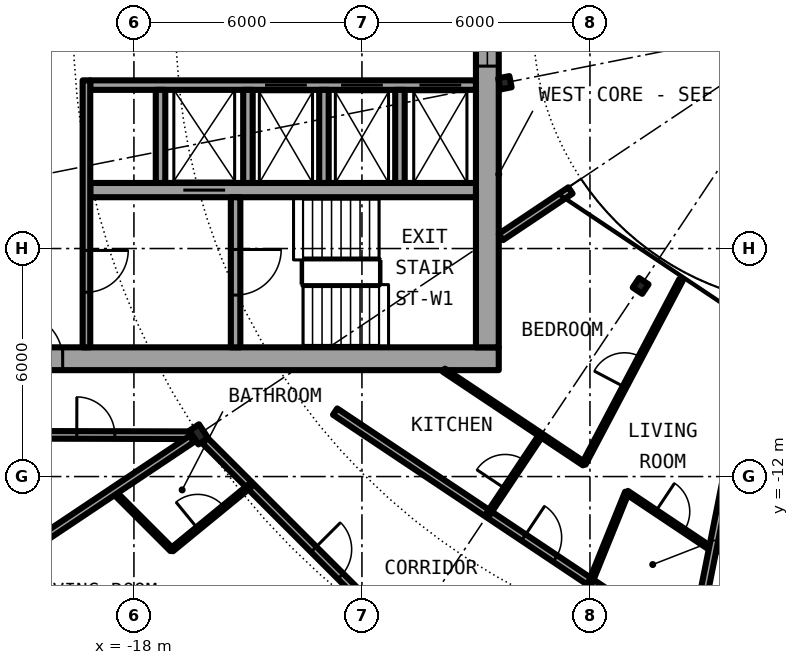
"""IFC4 building model, lengths in metres.
Left out: names, types, materials, properties, quantities, classifications, styles, units other than length and angle.
Written with IfcOpenShell. Run it as: python <this file> out.ifc"""

import sys

from ifc_helpers import new_model, si_unit, direction, frame, frame_2d, origin, origin_2d, place, context, subcontext, project, spatial, rectangle, i_section, extrude, element, fill, save


model = new_model("IFC4")
c1 = context("Model", 3, precision=1e-05, world=origin(), true_north=direction((0.0, 1.0)))
c2 = subcontext(c1, "Body", "Model", "MODEL_VIEW")
j1 = project(units=[si_unit("LENGTHUNIT", "METRE"), si_unit("PLANEANGLEUNIT", "RADIAN")], contexts=[c1])
p1 = place(None, origin())
s1 = spatial("IfcSite", under=j1, at=p1, CompositionType="ELEMENT")
p2 = place(p1, origin())
s2 = spatial("IfcBuilding", under=s1, at=p2, CompositionType="ELEMENT")
p3 = place(p2, frame((0.0, 0.0, 123.85)))
s3 = spatial("IfcBuildingStorey", under=s2, at=p3, CompositionType="ELEMENT", Elevation=123.85)
p4 = place(p3, frame((-16.297, -10.889, 0.0), z_axis=(0.0, 0.0, 1.0), x_axis=(-0.831469612303, -0.55557023302, 0.0)))
e1 = element("IfcColumn", 1, at=p4, inside=s3, PredefinedType="COLUMN", context=c2, shape_type="SweptSolid", body=[
    extrude(i_section(OverallWidth=0.307, OverallDepth=0.432, WebThickness=0.021, FlangeThickness=0.04, FilletRadius=0.027, at=origin_2d()), origin(), (0.0, 0.0, 1.0), 3.05),
])
for number, where, z_axis, x_axis in (
    (2, (-8.239, -1.639, 0.0), (0.0, 0.0, 1.0), (-0.981, -0.195, 0.0)),
    (3, (-4.667, -6.984, 0.0), (0.0, 0.0, 1.0), (-0.556, -0.831, 0.0)),
):
    element("IfcColumn", number, at=place(p3, frame(where, z_axis=z_axis, x_axis=x_axis)), inside=s3, PredefinedType="COLUMN", context=c2, shape_type="SweptSolid", body=[
        extrude(i_section(OverallWidth=0.3, OverallDepth=0.3, WebThickness=0.011, FlangeThickness=0.019, FilletRadius=0.027, at=origin_2d()), origin(), (0.0, 0.0, 1.0), 3.05),
    ])
p5 = place(p3, frame((-22.2, -8.9, 0.0), z_axis=(0.0, 0.0, 1.0), x_axis=(1.0, 0.0, 0.0)))
e4 = element("IfcWall", 4, at=p5, inside=s3, PredefinedType="SHEAR", context=c2, shape_type="SweptSolid", body=[
    extrude(rectangle(XDim=13.8, YDim=0.6, at=frame_2d((6.9, 0.0))), origin(), (0.0, 0.0, 1.0), 3.05),
])
p6 = place(p5, frame((1.125, 0.0, 0.0)))
e5 = element("IfcOpeningElement", 5, at=p6, cuts=e4, PredefinedType="OPENING", context=c2, shape_type="SweptSolid", body=[
    extrude(rectangle(XDim=1.2, YDim=2.3, at=frame_2d((0.6, 1.15))), frame((0.0, 0.31, 0.0), z_axis=(0.0, -1.0, 0.0), x_axis=(1.0, 0.0, 0.0)), (0.0, 0.0, 1.0), 0.62),
])
p7 = place(p3, frame((-8.7, 8.6, 0.0), z_axis=(0.0, 0.0, 1.0), x_axis=(0.0, -1.0, 0.0)))
e6 = element("IfcWall", 6, at=p7, inside=s3, PredefinedType="SHEAR", context=c2, shape_type="SweptSolid", body=[
    extrude(rectangle(XDim=17.2, YDim=0.6, at=frame_2d((8.6, 0.0))), origin(), (0.0, 0.0, 1.0), 3.05),
])
p8 = place(p7, frame((7.4, 0.0, 0.1)))
e7 = element("IfcOpeningElement", 7, at=p8, cuts=e6, PredefinedType="OPENING", context=c2, shape_type="SweptSolid", body=[
    extrude(rectangle(XDim=2.4, YDim=2.2, at=frame_2d((1.2, 1.1))), frame((0.0, 0.31, 0.0), z_axis=(0.0, -1.0, 0.0), x_axis=(1.0, 0.0, 0.0)), (0.0, 0.0, 1.0), 0.62),
])
p9 = place(p3, frame((-9.0, -1.7, 0.0), z_axis=(0.0, 0.0, 1.0), x_axis=(-1.0, 0.0, 0.0)))
e8 = element("IfcWall", 8, at=p9, inside=s3, PredefinedType="SHEAR", context=c2, shape_type="SweptSolid", body=[
    extrude(rectangle(XDim=10.15, YDim=0.25, at=frame_2d((5.075, 0.0))), origin(), (0.0, 0.0, 1.0), 3.05),
])
p10 = place(p9, frame((0.387, 0.0, 0.0)))
e9 = element("IfcOpeningElement", 9, at=p10, cuts=e8, PredefinedType="OPENING", context=c2, shape_type="SweptSolid", body=[
    extrude(rectangle(XDim=1.1, YDim=2.3, at=frame_2d((0.55, 1.15))), frame((0.0, 0.135, 0.0), z_axis=(0.0, -1.0, 0.0), x_axis=(1.0, 0.0, 0.0)), (0.0, 0.0, 1.0), 0.27),
])
p11 = place(p9, frame((2.45, 0.0, 0.0)))
e10 = element("IfcOpeningElement", 10, at=p11, cuts=e8, PredefinedType="OPENING", context=c2, shape_type="SweptSolid", body=[
    extrude(rectangle(XDim=1.1, YDim=2.3, at=frame_2d((0.55, 1.15))), frame((0.0, 0.135, 0.0), z_axis=(0.0, -1.0, 0.0), x_axis=(1.0, 0.0, 0.0)), (0.0, 0.0, 1.0), 0.27),
])
p12 = place(p9, frame((4.45, 0.0, 0.0)))
e11 = element("IfcOpeningElement", 11, at=p12, cuts=e8, PredefinedType="OPENING", context=c2, shape_type="SweptSolid", body=[
    extrude(rectangle(XDim=1.1, YDim=2.3, at=frame_2d((0.55, 1.15))), frame((0.0, 0.135, 0.0), z_axis=(0.0, -1.0, 0.0), x_axis=(1.0, 0.0, 0.0)), (0.0, 0.0, 1.0), 0.27),
])
p13 = place(p3, frame((-9.0, -4.462, 0.0), z_axis=(0.0, 0.0, 1.0), x_axis=(-1.0, 0.0, 0.0)))
e12 = element("IfcWall", 12, at=p13, inside=s3, PredefinedType="SHEAR", context=c2, shape_type="SweptSolid", body=[
    extrude(rectangle(XDim=10.15, YDim=0.375, at=frame_2d((5.075, 0.0))), origin(), (0.0, 0.0, 1.0), 3.05),
])
p14 = place(p13, frame((6.6, 0.0, 0.0)))
e13 = element("IfcOpeningElement", 13, at=p14, cuts=e12, PredefinedType="OPENING", context=c2, shape_type="SweptSolid", body=[
    extrude(rectangle(XDim=1.1, YDim=2.3, at=frame_2d((0.55, 1.15))), frame((0.0, 0.198, 0.0), z_axis=(0.0, -1.0, 0.0), x_axis=(1.0, 0.0, 0.0)), (0.0, 0.0, 1.0), 0.395),
])
p15 = place(p3, frame((-15.325, -4.65, 0.0), z_axis=(0.0, 0.0, 1.0), x_axis=(0.0, -1.0, 0.0)))
e14 = element("IfcWall", 14, at=p15, inside=s3, PredefinedType="SHEAR", context=c2, shape_type="SweptSolid", body=[
    extrude(rectangle(XDim=3.95, YDim=0.25, at=frame_2d((1.975, 0.0))), origin(), (0.0, 0.0, 1.0), 3.05),
])
p16 = place(p15, frame((1.375, 0.0, 0.0)))
e15 = element("IfcOpeningElement", 15, at=p16, cuts=e14, PredefinedType="OPENING", context=c2, shape_type="SweptSolid", body=[
    extrude(rectangle(XDim=1.2, YDim=2.3, at=frame_2d((0.6, 1.15))), frame((0.0, 0.135, 0.0), z_axis=(0.0, -1.0, 0.0), x_axis=(1.0, 0.0, 0.0)), (0.0, 0.0, 1.0), 0.27),
])
for number, where, z_axis, x_axis in (
    (16, (-15.0, -1.825, 0.0), (0.0, 0.0, 1.0), (0.0, -1.0, 0.0)),
    (17, (-17.3, -1.825, 0.0), (0.0, 0.0, 1.0), (0.0, -1.0, 0.0)),
):
    element("IfcWall", number, at=place(p3, frame(where, z_axis=z_axis, x_axis=x_axis)), inside=s3, PredefinedType="SOLIDWALL", context=c2, shape_type="SweptSolid", body=[
        extrude(rectangle(XDim=2.45, YDim=0.25, at=frame_2d((1.225, 0.0))), origin(), (0.0, 0.0, 1.0), 2.7),
    ])
p17 = place(p3, frame((-19.25, -1.575, 0.0), z_axis=(0.0, 0.0, 1.0), x_axis=(0.0, -1.0, 0.0)))
e18 = element("IfcWall", 18, at=p17, inside=s3, PredefinedType="SOLIDWALL", context=c2, shape_type="SweptSolid", body=[
    extrude(rectangle(XDim=7.025, YDim=0.2, at=frame_2d((3.513, 0.0))), origin(), (0.0, 0.0, 1.0), 2.7),
])
p18 = place(p17, frame((4.475, 0.0, 0.0)))
e19 = element("IfcOpeningElement", 19, at=p18, cuts=e18, PredefinedType="OPENING", context=c2, shape_type="SweptSolid", body=[
    extrude(rectangle(XDim=1.1, YDim=2.3, at=frame_2d((0.55, 1.15))), frame((0.0, 0.11, 0.0), z_axis=(0.0, -1.0, 0.0), x_axis=(1.0, 0.0, 0.0)), (0.0, 0.0, 1.0), 0.22),
])
for number, where, z_axis, x_axis in (
    (20, (-11.0, -1.825, 0.0), (0.0, 0.0, 1.0), (0.0, -1.0, 0.0)),
    (21, (-13.0, -1.825, 0.0), (0.0, 0.0, 1.0), (0.0, -1.0, 0.0)),
):
    element("IfcWall", number, at=place(p3, frame(where, z_axis=z_axis, x_axis=x_axis)), inside=s3, PredefinedType="SOLIDWALL", context=c2, shape_type="SweptSolid", body=[
        extrude(rectangle(XDim=2.45, YDim=0.25, at=frame_2d((1.225, 0.0))), origin(), (0.0, 0.0, 1.0), 2.7),
    ])
p19 = place(p3, frame((-18.542, -12.389, 0.0), z_axis=(0.0, 0.0, 1.0), x_axis=(0.707106781187, -0.707106781187, 0.0)))
e22 = element("IfcWall", 22, at=p19, inside=s3, PredefinedType="PARTITIONING", context=c2, shape_type="SweptSolid", body=[
    extrude(rectangle(XDim=2.175, YDim=0.1, at=frame_2d((1.088, 0.0))), origin(), (0.0, 0.0, 1.0), 2.7),
])
p20 = place(p3, frame((-16.186, -11.0, 0.0), z_axis=(0.0, 0.0, 1.0), x_axis=(0.707106781187, -0.707106781187, 0.0)))
e23 = element("IfcWall", 23, at=p20, inside=s3, PredefinedType="PARTITIONING", context=c2, shape_type="SweptSolid", body=[
    extrude(rectangle(XDim=7.334, YDim=0.2, at=frame_2d((3.667, 0.0))), origin(), (0.0, 0.0, 1.0), 2.39),
])
p21 = place(p20, frame((4.123, 0.0, 0.0)))
e24 = element("IfcOpeningElement", 24, at=p21, cuts=e23, PredefinedType="OPENING", context=c2, shape_type="SweptSolid", body=[
    extrude(rectangle(XDim=1.0, YDim=2.3, at=frame_2d((0.5, 1.15))), frame((0.0, 0.11, 0.0), z_axis=(0.0, -1.0, 0.0), x_axis=(1.0, 0.0, 0.0)), (0.0, 0.0, 1.0), 0.22),
])
p22 = place(p3, frame((-12.706, -10.291, 0.0), z_axis=(0.0, 0.0, 1.0), x_axis=(0.831588572532, -0.555392155178, 0.0)))
e25 = element("IfcWall", 25, at=p22, inside=s3, PredefinedType="PARTITIONING", context=c2, shape_type="SweptSolid", body=[
    extrude(rectangle(XDim=11.314, YDim=0.2, at=frame_2d((5.657, 0.0))), origin(), (0.0, 0.0, 1.0), 2.7),
])
p23 = place(p22, frame((5.966, 0.0, 0.0)))
e26 = element("IfcOpeningElement", 26, at=p23, cuts=e25, PredefinedType="OPENING", context=c2, shape_type="SweptSolid", body=[
    extrude(rectangle(XDim=1.0, YDim=2.3, at=frame_2d((0.5, 1.15))), frame((0.0, 0.11, 0.0), z_axis=(0.0, -1.0, 0.0), x_axis=(1.0, 0.0, 0.0)), (0.0, 0.0, 1.0), 0.22),
])
p24 = place(p3, frame((-2.772, -13.927, 0.0), z_axis=(0.0, 0.0, 1.0), x_axis=(0.998787571158, 0.04922791586, 0.0)))
e27 = element("IfcWall", 27, at=p24, inside=s3, PredefinedType="PARTITIONING", context=c2, shape_type="SweptSolid", body=[
    extrude(rectangle(XDim=2.762, YDim=0.1, at=frame_2d((1.381, 0.0))), origin(), (0.0, 0.0, 1.0), 2.7),
])
p25 = place(p24, frame((0.933, 0.0, 0.0)))
e28 = element("IfcOpeningElement", 28, at=p25, cuts=e27, PredefinedType="OPENING", context=c2, shape_type="SweptSolid", body=[
    extrude(rectangle(XDim=0.9, YDim=2.3, at=frame_2d((0.45, 1.15))), frame((0.0, 0.06, 0.0), z_axis=(0.0, -1.0, 0.0), x_axis=(1.0, 0.0, 0.0)), (0.0, 0.0, 1.0), 0.12),
])
p26 = place(p3, frame((-9.844, -9.202, 0.0), z_axis=(0.0, 0.0, 1.0), x_axis=(0.831617979783, -0.555348121183, 0.0)))
e29 = element("IfcWall", 29, at=p26, inside=s3, PredefinedType="PARTITIONING", context=c2, shape_type="SweptSolid", body=[
    extrude(rectangle(XDim=4.434, YDim=0.1, at=frame_2d((2.217, 0.0))), origin(), (0.0, 0.0, 1.0), 2.7),
])
p27 = place(p3, frame((-5.029, -12.418, 0.0), z_axis=(0.0, 0.0, 1.0), x_axis=(0.831538390496, -0.555467285384, 0.0)))
e30 = element("IfcWall", 30, at=p27, inside=s3, PredefinedType="PARTITIONING", context=c2, shape_type="SweptSolid", body=[
    extrude(rectangle(XDim=2.717, YDim=0.1, at=frame_2d((1.358, 0.0))), origin(), (0.0, 0.0, 1.0), 2.7),
])
p28 = place(p27, frame((0.908, 0.0, 0.0)))
e31 = element("IfcOpeningElement", 31, at=p28, cuts=e30, PredefinedType="OPENING", context=c2, shape_type="SweptSolid", body=[
    extrude(rectangle(XDim=0.9, YDim=2.3, at=frame_2d((0.45, 1.15))), frame((0.0, 0.06, 0.0), z_axis=(0.0, -1.0, 0.0), x_axis=(1.0, 0.0, 0.0)), (0.0, 0.0, 1.0), 0.12),
])
p29 = place(p3, frame((-21.675, -10.9, 0.0), z_axis=(0.0, 0.0, 1.0), x_axis=(0.999997173357, -0.002377662213, 0.0)))
e32 = element("IfcWall", 32, at=p29, inside=s3, PredefinedType="PARTITIONING", context=c2, shape_type="SweptSolid", body=[
    extrude(rectangle(XDim=5.134, YDim=0.2, at=frame_2d((2.567, 0.0))), origin(), (0.0, 0.0, 1.0), 2.7),
])
p30 = place(p29, frame((2.171, 0.0, 0.0)))
e33 = element("IfcOpeningElement", 33, at=p30, cuts=e32, PredefinedType="OPENING", context=c2, shape_type="SweptSolid", body=[
    extrude(rectangle(XDim=1.0, YDim=2.3, at=frame_2d((0.5, 1.15))), frame((0.0, 0.11, 0.0), z_axis=(0.0, -1.0, 0.0), x_axis=(1.0, 0.0, 0.0)), (0.0, 0.0, 1.0), 0.22),
])
p31 = place(p3, frame((-6.513, -4.472, 0.0), z_axis=(0.0, 0.0, 1.0), x_axis=(-0.831333375071, -0.555774072347, 0.0)))
e34 = element("IfcWall", 34, at=p31, inside=s3, PredefinedType="PARTITIONING", context=c2, shape_type="SweptSolid", body=[
    extrude(rectangle(XDim=2.203, YDim=0.2, at=frame_2d((1.101, 0.0))), origin(), (0.0, 0.0, 1.0), 2.7),
])
p32 = place(p3, frame((-22.595, -15.097, 0.0), z_axis=(0.0, 0.0, 1.0), x_axis=(0.831467903109, 0.555572791, 0.0)))
e35 = element("IfcWall", 35, at=p32, inside=s3, PredefinedType="PARTITIONING", context=c2, shape_type="SweptSolid", body=[
    extrude(rectangle(XDim=7.358, YDim=0.2, at=frame_2d((3.679, 0.0))), origin(), (0.0, 0.0, 1.0), 2.7),
])
p33 = place(p3, frame((-17.004, -13.927, 0.0), z_axis=(0.0, 0.0, 1.0), x_axis=(0.77367517848, 0.633582447834, 0.0)))
e36 = element("IfcWall", 36, at=p33, inside=s3, PredefinedType="PARTITIONING", context=c2, shape_type="SweptSolid", body=[
    extrude(rectangle(XDim=2.661, YDim=0.1, at=frame_2d((1.331, 0.0))), origin(), (0.0, 0.0, 1.0), 2.7),
])
p34 = place(p33, frame((0.881, 0.0, 0.0)))
e37 = element("IfcOpeningElement", 37, at=p34, cuts=e36, PredefinedType="OPENING", context=c2, shape_type="SweptSolid", body=[
    extrude(rectangle(XDim=0.9, YDim=2.3, at=frame_2d((0.45, 1.15))), frame((0.0, 0.06, 0.0), z_axis=(0.0, -1.0, 0.0), x_axis=(1.0, 0.0, 0.0)), (0.0, 0.0, 1.0), 0.12),
])
p35 = place(p3, frame((-8.675, -12.982, 0.0), z_axis=(0.0, 0.0, 1.0), x_axis=(0.555625883274, 0.831432425297, 0.0)))
e38 = element("IfcWall", 38, at=p35, inside=s3, PredefinedType="PARTITIONING", context=c2, shape_type="SweptSolid", body=[
    extrude(rectangle(XDim=2.494, YDim=0.1, at=frame_2d((1.247, 0.0))), origin(), (0.0, 0.0, 1.0), 2.7),
])
p36 = place(p35, frame((0.798, 0.0, 0.0)))
e39 = element("IfcOpeningElement", 39, at=p36, cuts=e38, PredefinedType="OPENING", context=c2, shape_type="SweptSolid", body=[
    extrude(rectangle(XDim=0.9, YDim=2.3, at=frame_2d((0.45, 1.15))), frame((0.0, 0.06, 0.0), z_axis=(0.0, -1.0, 0.0), x_axis=(1.0, 0.0, 0.0)), (0.0, 0.0, 1.0), 0.12),
])
p37 = place(p3, frame((-6.159, -11.663, 0.0), z_axis=(0.0, 0.0, 1.0), x_axis=(0.466976820365, 0.884269556889, 0.0)))
e40 = element("IfcWall", 40, at=p37, inside=s3, PredefinedType="PARTITIONING", context=c2, shape_type="SweptSolid", body=[
    extrude(rectangle(XDim=5.469, YDim=0.1, at=frame_2d((2.735, 0.0))), origin(), (0.0, 0.0, 1.0), 2.7),
])
p38 = place(p37, frame((2.284, 0.0, 0.0)))
e41 = element("IfcOpeningElement", 41, at=p38, cuts=e40, PredefinedType="OPENING", context=c2, shape_type="SweptSolid", body=[
    extrude(rectangle(XDim=0.9, YDim=2.3, at=frame_2d((0.45, 1.15))), frame((0.0, 0.06, 0.0), z_axis=(0.0, -1.0, 0.0), x_axis=(1.0, 0.0, 0.0)), (0.0, 0.0, 1.0), 0.12),
])
p39 = place(p3, frame((-5.986, -14.779, 0.0), z_axis=(0.0, 0.0, 1.0), x_axis=(0.375649498413, 0.926761811008, 0.0)))
e42 = element("IfcWall", 42, at=p39, inside=s3, PredefinedType="PARTITIONING", context=c2, shape_type="SweptSolid", body=[
    extrude(rectangle(XDim=2.548, YDim=0.1, at=frame_2d((1.274, 0.0))), origin(), (0.0, 0.0, 1.0), 2.7),
])
p40 = place(p3, frame((-3.302, -16.574, 0.0), z_axis=(0.0, 0.0, 1.0), x_axis=(0.195543237077, 0.980695081273, 0.0)))
e43 = element("IfcWall", 43, at=p40, inside=s3, PredefinedType="PARTITIONING", context=c2, shape_type="SweptSolid", body=[
    extrude(rectangle(XDim=9.179, YDim=0.2, at=frame_2d((4.59, 0.0))), origin(), (0.0, 0.0, 1.0), 2.7),
])
p41 = place(p10, origin())
e44 = element("IfcDoor", 44, at=p41, inside=s3, OperationType="DOUBLE_DOOR_SLIDING", PredefinedType="DOOR", context=c2, shape_type="SweptSolid", body=[
    extrude(rectangle(XDim=1.1, YDim=2.3, at=frame_2d((0.55, 1.15))), frame((0.0, 0.025, 0.0), z_axis=(0.0, -1.0, 0.0), x_axis=(1.0, 0.0, 0.0)), (0.0, 0.0, 1.0), 0.05),
])
fill(e9, e44)
p42 = place(p11, origin())
e45 = element("IfcDoor", 45, at=p42, inside=s3, OperationType="DOUBLE_DOOR_SLIDING", PredefinedType="DOOR", context=c2, shape_type="SweptSolid", body=[
    extrude(rectangle(XDim=1.1, YDim=2.3, at=frame_2d((0.55, 1.15))), frame((0.0, 0.025, 0.0), z_axis=(0.0, -1.0, 0.0), x_axis=(1.0, 0.0, 0.0)), (0.0, 0.0, 1.0), 0.05),
])
fill(e10, e45)
p43 = place(p12, origin())
e46 = element("IfcDoor", 46, at=p43, inside=s3, OperationType="DOUBLE_DOOR_SLIDING", PredefinedType="DOOR", context=c2, shape_type="SweptSolid", body=[
    extrude(rectangle(XDim=1.1, YDim=2.3, at=frame_2d((0.55, 1.15))), frame((0.0, 0.025, 0.0), z_axis=(0.0, -1.0, 0.0), x_axis=(1.0, 0.0, 0.0)), (0.0, 0.0, 1.0), 0.05),
])
fill(e11, e46)
p44 = place(p14, origin())
e47 = element("IfcDoor", 47, at=p44, inside=s3, OperationType="DOUBLE_DOOR_SLIDING", PredefinedType="DOOR", context=c2, shape_type="SweptSolid", body=[
    extrude(rectangle(XDim=1.1, YDim=2.3, at=frame_2d((0.55, 1.15))), frame((0.0, 0.025, 0.0), z_axis=(0.0, -1.0, 0.0), x_axis=(1.0, 0.0, 0.0)), (0.0, 0.0, 1.0), 0.05),
])
fill(e13, e47)
p45 = place(p16, origin())
e48 = element("IfcDoor", 48, at=p45, inside=s3, OperationType="SINGLE_SWING_LEFT", PredefinedType="DOOR", context=c2, shape_type="SweptSolid", body=[
    extrude(rectangle(XDim=1.2, YDim=2.3, at=frame_2d((0.6, 1.15))), frame((0.0, 0.025, 0.0), z_axis=(0.0, -1.0, 0.0), x_axis=(1.0, 0.0, 0.0)), (0.0, 0.0, 1.0), 0.05),
])
fill(e15, e48)
p46 = place(p18, origin())
e49 = element("IfcDoor", 49, at=p46, inside=s3, OperationType="SINGLE_SWING_LEFT", PredefinedType="DOOR", context=c2, shape_type="SweptSolid", body=[
    extrude(rectangle(XDim=1.1, YDim=2.3, at=frame_2d((0.55, 1.15))), frame((0.0, 0.025, 0.0), z_axis=(0.0, -1.0, 0.0), x_axis=(1.0, 0.0, 0.0)), (0.0, 0.0, 1.0), 0.05),
])
fill(e19, e49)
p47 = place(p6, origin())
e50 = element("IfcDoor", 50, at=p47, inside=s3, OperationType="SINGLE_SWING_RIGHT", PredefinedType="DOOR", context=c2, shape_type="SweptSolid", body=[
    extrude(rectangle(XDim=1.2, YDim=2.3, at=frame_2d((0.6, 1.15))), frame((0.0, 0.025, 0.0), z_axis=(0.0, -1.0, 0.0), x_axis=(1.0, 0.0, 0.0)), (0.0, 0.0, 1.0), 0.05),
])
fill(e5, e50)
p48 = place(p8, origin())
e51 = element("IfcWindow", 51, at=p48, inside=s3, PartitioningType="SINGLE_PANEL", PredefinedType="WINDOW", context=c2, shape_type="SweptSolid", body=[
    extrude(rectangle(XDim=2.4, YDim=2.2, at=frame_2d((1.2, 1.1))), frame((0.0, 0.03, 0.0), z_axis=(0.0, -1.0, 0.0), x_axis=(1.0, 0.0, 0.0)), (0.0, 0.0, 1.0), 0.06),
])
fill(e7, e51)
p49 = place(p21, origin())
e52 = element("IfcDoor", 52, at=p49, inside=s3, OperationType="SINGLE_SWING_RIGHT", PredefinedType="DOOR", context=c2, shape_type="SweptSolid", body=[
    extrude(rectangle(XDim=1.0, YDim=2.3, at=frame_2d((0.5, 1.15))), frame((0.0, 0.025, 0.0), z_axis=(0.0, -1.0, 0.0), x_axis=(1.0, 0.0, 0.0)), (0.0, 0.0, 1.0), 0.05),
])
fill(e24, e52)
p50 = place(p34, origin())
e53 = element("IfcDoor", 53, at=p50, inside=s3, OperationType="SINGLE_SWING_RIGHT", PredefinedType="DOOR", context=c2, shape_type="SweptSolid", body=[
    extrude(rectangle(XDim=0.9, YDim=2.3, at=frame_2d((0.45, 1.15))), frame((0.0, 0.025, 0.0), z_axis=(0.0, -1.0, 0.0), x_axis=(1.0, 0.0, 0.0)), (0.0, 0.0, 1.0), 0.05),
])
fill(e37, e53)
p51 = place(p23, origin())
e54 = element("IfcDoor", 54, at=p51, inside=s3, OperationType="SINGLE_SWING_RIGHT", PredefinedType="DOOR", context=c2, shape_type="SweptSolid", body=[
    extrude(rectangle(XDim=1.0, YDim=2.3, at=frame_2d((0.5, 1.15))), frame((0.0, 0.025, 0.0), z_axis=(0.0, -1.0, 0.0), x_axis=(1.0, 0.0, 0.0)), (0.0, 0.0, 1.0), 0.05),
])
fill(e26, e54)
p52 = place(p28, origin())
e55 = element("IfcDoor", 55, at=p52, inside=s3, OperationType="SINGLE_SWING_LEFT", PredefinedType="DOOR", context=c2, shape_type="SweptSolid", body=[
    extrude(rectangle(XDim=0.9, YDim=2.3, at=frame_2d((0.45, 1.15))), frame((0.0, 0.025, 0.0), z_axis=(0.0, -1.0, 0.0), x_axis=(1.0, 0.0, 0.0)), (0.0, 0.0, 1.0), 0.05),
])
fill(e31, e55)
p53 = place(p36, origin())
e56 = element("IfcDoor", 56, at=p53, inside=s3, OperationType="SINGLE_SWING_RIGHT", PredefinedType="DOOR", context=c2, shape_type="SweptSolid", body=[
    extrude(rectangle(XDim=0.9, YDim=2.3, at=frame_2d((0.45, 1.15))), frame((0.0, 0.025, 0.0), z_axis=(0.0, -1.0, 0.0), x_axis=(1.0, 0.0, 0.0)), (0.0, 0.0, 1.0), 0.05),
])
fill(e39, e56)
p54 = place(p38, origin())
e57 = element("IfcDoor", 57, at=p54, inside=s3, OperationType="SINGLE_SWING_LEFT", PredefinedType="DOOR", context=c2, shape_type="SweptSolid", body=[
    extrude(rectangle(XDim=0.9, YDim=2.3, at=frame_2d((0.45, 1.15))), frame((0.0, 0.025, 0.0), z_axis=(0.0, -1.0, 0.0), x_axis=(1.0, 0.0, 0.0)), (0.0, 0.0, 1.0), 0.05),
])
fill(e41, e57)
p55 = place(p30, origin())
e58 = element("IfcDoor", 58, at=p55, inside=s3, OperationType="SINGLE_SWING_RIGHT", PredefinedType="DOOR", context=c2, shape_type="SweptSolid", body=[
    extrude(rectangle(XDim=1.0, YDim=2.3, at=frame_2d((0.5, 1.15))), frame((0.0, 0.025, 0.0), z_axis=(0.0, -1.0, 0.0), x_axis=(1.0, 0.0, 0.0)), (0.0, 0.0, 1.0), 0.05),
])
fill(e33, e58)
save(model, sys.argv[1])
